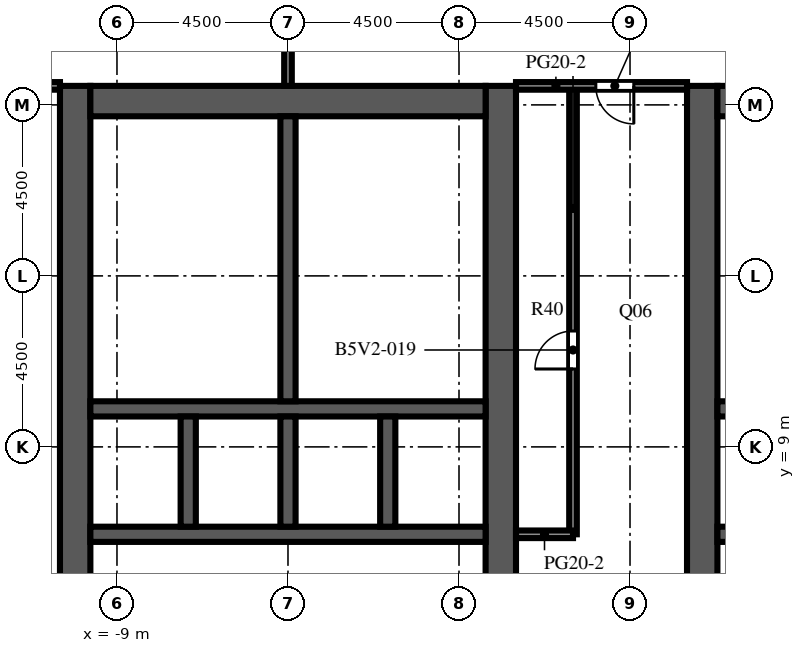
"""IFC4 building model, lengths in metres.
Left out: names, types, materials, properties, quantities, classifications, styles, units other than length and angle.
Written with IfcOpenShell. Run it as: python <this file> out.ifc"""

import sys

from ifc_helpers import new_model, si_unit, direction, frame, frame_2d, origin, place, context, subcontext, project, spatial, rectangle, extrude, element, fill, save


model = new_model("IFC4")
c1 = context("Model", 3, precision=1e-05, world=origin(), true_north=direction((0.0, 1.0)))
c2 = subcontext(c1, "Body", "Model", "MODEL_VIEW")
j1 = project(units=[si_unit("LENGTHUNIT", "METRE"), si_unit("PLANEANGLEUNIT", "RADIAN")], contexts=[c1])
p1 = place(None, origin())
s1 = spatial("IfcSite", under=j1, at=p1, CompositionType="ELEMENT")
p2 = place(p1, origin())
s2 = spatial("IfcBuilding", under=s1, at=p2, CompositionType="ELEMENT")
p3 = place(p2, frame((0.0, 0.0, 181.4)))
s3 = spatial("IfcBuildingStorey", under=s2, at=p3, CompositionType="ELEMENT", Elevation=181.4)
p4 = place(p3, frame((-10.1, -9.0, 0.0), z_axis=(0.0, 0.0, 1.0), x_axis=(0.0, 1.0, 0.0)))
e1 = element("IfcWall", 1, at=p4, inside=s3, PredefinedType="SHEAR", context=c2, shape_type="SweptSolid", body=[
    extrude(rectangle(XDim=27.5, YDim=0.8, at=frame_2d((13.75, 0.0))), origin(), (0.0, 0.0, 1.0), 4.1),
])
p5 = place(p4, frame((12.55, 0.0, 0.0)))
e2 = element("IfcOpeningElement", 2, at=p5, cuts=e1, PredefinedType="OPENING", context=c2, shape_type="SweptSolid", body=[
    extrude(rectangle(XDim=2.4, YDim=2.4, at=frame_2d((1.2, 1.2))), frame((0.0, 0.41, 0.0), z_axis=(0.0, -1.0, 0.0), x_axis=(1.0, 0.0, 0.0)), (0.0, 0.0, 1.0), 0.82),
])
p6 = place(p4, frame((6.825, 0.0, 0.0)))
e3 = element("IfcOpeningElement", 3, at=p6, cuts=e1, PredefinedType="OPENING", context=c2, shape_type="SweptSolid", body=[
    extrude(rectangle(XDim=1.2, YDim=2.1, at=frame_2d((0.6, 1.05))), frame((0.0, 0.41, 0.0), z_axis=(0.0, -1.0, 0.0), x_axis=(1.0, 0.0, 0.0)), (0.0, 0.0, 1.0), 0.82),
])
p7 = place(p4, frame((19.475, 0.0, 0.0)))
e4 = element("IfcOpeningElement", 4, at=p7, cuts=e1, PredefinedType="OPENING", context=c2, shape_type="SweptSolid", body=[
    extrude(rectangle(XDim=1.2, YDim=2.1, at=frame_2d((0.6, 1.05))), frame((0.0, 0.41, 0.0), z_axis=(0.0, -1.0, 0.0), x_axis=(1.0, 0.0, 0.0)), (0.0, 0.0, 1.0), 0.82),
])
p8 = place(p3, frame((1.1, -9.0, 0.0), z_axis=(0.0, 0.0, 1.0), x_axis=(0.0, 1.0, 0.0)))
e5 = element("IfcWall", 5, at=p8, inside=s3, PredefinedType="SHEAR", context=c2, shape_type="SweptSolid", body=[
    extrude(rectangle(XDim=27.5, YDim=0.8, at=frame_2d((13.75, 0.0))), origin(), (0.0, 0.0, 1.0), 4.1),
])
p9 = place(p8, frame((12.55, 0.0, 0.0)))
e6 = element("IfcOpeningElement", 6, at=p9, cuts=e5, PredefinedType="OPENING", context=c2, shape_type="SweptSolid", body=[
    extrude(rectangle(XDim=2.4, YDim=2.4, at=frame_2d((1.2, 1.2))), frame((0.0, 0.41, 0.0), z_axis=(0.0, -1.0, 0.0), x_axis=(1.0, 0.0, 0.0)), (0.0, 0.0, 1.0), 0.82),
])
p10 = place(p8, frame((3.85, 0.0, 0.0)))
e7 = element("IfcOpeningElement", 7, at=p10, cuts=e5, PredefinedType="OPENING", context=c2, shape_type="SweptSolid", body=[
    extrude(rectangle(XDim=0.95, YDim=2.1, at=frame_2d((0.475, 1.05))), frame((0.0, 0.41, 0.0), z_axis=(0.0, -1.0, 0.0), x_axis=(1.0, 0.0, 0.0)), (0.0, 0.0, 1.0), 0.82),
])
p11 = place(p8, frame((23.475, 0.0, 0.0)))
e8 = element("IfcOpeningElement", 8, at=p11, cuts=e5, PredefinedType="OPENING", context=c2, shape_type="SweptSolid", body=[
    extrude(rectangle(XDim=1.2, YDim=2.1, at=frame_2d((0.6, 1.05))), frame((0.0, 0.41, 0.0), z_axis=(0.0, -1.0, 0.0), x_axis=(1.0, 0.0, 0.0)), (0.0, 0.0, 1.0), 0.82),
])
p12 = place(p3, frame((-9.7, 18.1, 0.0), z_axis=(0.0, 0.0, 1.0), x_axis=(1.0, 0.0, 0.0)))
e9 = element("IfcWall", 9, at=p12, inside=s3, PredefinedType="SHEAR", context=c2, shape_type="SweptSolid", body=[
    extrude(rectangle(XDim=10.4, YDim=0.8, at=frame_2d((5.2, 0.0))), origin(), (0.0, 0.0, 1.0), 4.1),
])
p13 = place(p3, frame((-9.7, 6.7, 0.0), z_axis=(0.0, 0.0, 1.0), x_axis=(1.0, 0.0, 0.0)))
e10 = element("IfcWall", 10, at=p13, inside=s3, PredefinedType="SHEAR", context=c2, shape_type="SweptSolid", body=[
    extrude(rectangle(XDim=10.4, YDim=0.4, at=frame_2d((5.2, 0.0))), origin(), (0.0, 0.0, 1.0), 4.1),
])
p14 = place(p13, frame((3.337, 0.0, 0.0)))
e11 = element("IfcOpeningElement", 11, at=p14, cuts=e10, PredefinedType="OPENING", context=c2, shape_type="SweptSolid", body=[
    extrude(rectangle(XDim=1.1, YDim=2.1, at=frame_2d((0.55, 1.05))), frame((0.0, 0.21, 0.0), z_axis=(0.0, -1.0, 0.0), x_axis=(1.0, 0.0, 0.0)), (0.0, 0.0, 1.0), 0.42),
])
p15 = place(p13, frame((5.962, 0.0, 0.0)))
e12 = element("IfcOpeningElement", 12, at=p15, cuts=e10, PredefinedType="OPENING", context=c2, shape_type="SweptSolid", body=[
    extrude(rectangle(XDim=1.1, YDim=2.1, at=frame_2d((0.55, 1.05))), frame((0.0, 0.21, 0.0), z_axis=(0.0, -1.0, 0.0), x_axis=(1.0, 0.0, 0.0)), (0.0, 0.0, 1.0), 0.42),
])
p16 = place(p13, frame((8.663, 0.0, 0.0)))
e13 = element("IfcOpeningElement", 13, at=p16, cuts=e10, PredefinedType="OPENING", context=c2, shape_type="SweptSolid", body=[
    extrude(rectangle(XDim=1.1, YDim=2.1, at=frame_2d((0.55, 1.05))), frame((0.0, 0.21, 0.0), z_axis=(0.0, -1.0, 0.0), x_axis=(1.0, 0.0, 0.0)), (0.0, 0.0, 1.0), 0.42),
])
p17 = place(p13, frame((0.688, 0.0, 0.0)))
e14 = element("IfcOpeningElement", 14, at=p17, cuts=e10, PredefinedType="OPENING", context=c2, shape_type="SweptSolid", body=[
    extrude(rectangle(XDim=1.0, YDim=2.1, at=frame_2d((0.5, 1.05))), frame((0.0, 0.21, 0.0), z_axis=(0.0, -1.0, 0.0), x_axis=(1.0, 0.0, 0.0)), (0.0, 0.0, 1.0), 0.42),
])
p18 = place(p3, frame((-9.7, 10.0, 0.0), z_axis=(0.0, 0.0, 1.0), x_axis=(1.0, 0.0, 0.0)))
e15 = element("IfcWall", 15, at=p18, inside=s3, PredefinedType="SHEAR", context=c2, shape_type="SweptSolid", body=[
    extrude(rectangle(XDim=10.4, YDim=0.4, at=frame_2d((5.2, 0.0))), origin(), (0.0, 0.0, 1.0), 4.1),
])
for number, where, z_axis, x_axis in (
    (16, (-7.125, 6.9, 0.0), (0.0, 0.0, 1.0), (0.0, 1.0, 0.0)),
    (17, (-4.5, 6.9, 0.0), (0.0, 0.0, 1.0), (0.0, 1.0, 0.0)),
    (18, (-1.875, 6.9, 0.0), (0.0, 0.0, 1.0), (0.0, 1.0, 0.0)),
):
    element("IfcWall", number, at=place(p3, frame(where, z_axis=z_axis, x_axis=x_axis)), inside=s3, PredefinedType="SHEAR", context=c2, shape_type="SweptSolid", body=[
        extrude(rectangle(XDim=2.9, YDim=0.4, at=frame_2d((1.45, 0.0))), origin(), (0.0, 0.0, 1.0), 4.1),
    ])
p19 = place(p3, frame((-4.5, 10.2, 0.0), z_axis=(0.0, 0.0, 1.0), x_axis=(0.0, 1.0, 0.0)))
e19 = element("IfcWall", 19, at=p19, inside=s3, PredefinedType="SHEAR", context=c2, shape_type="SweptSolid", body=[
    extrude(rectangle(XDim=7.5, YDim=0.4, at=frame_2d((3.75, 0.0))), origin(), (0.0, 0.0, 1.0), 4.1),
])
p20 = place(p3, frame((6.4, -9.0, 0.0), z_axis=(0.0, 0.0, 1.0), x_axis=(0.0, 1.0, 0.0)))
e20 = element("IfcWall", 20, at=p20, inside=s3, PredefinedType="SHEAR", context=c2, shape_type="SweptSolid", body=[
    extrude(rectangle(XDim=27.5, YDim=0.8, at=frame_2d((13.75, 0.0))), origin(), (0.0, 0.0, 1.0), 4.1),
])
p21 = place(p20, frame((12.55, 0.0, 0.0)))
e21 = element("IfcOpeningElement", 21, at=p21, cuts=e20, PredefinedType="OPENING", context=c2, shape_type="SweptSolid", body=[
    extrude(rectangle(XDim=2.4, YDim=2.4, at=frame_2d((1.2, 1.2))), frame((0.0, 0.41, 0.0), z_axis=(0.0, -1.0, 0.0), x_axis=(1.0, 0.0, 0.0)), (0.0, 0.0, 1.0), 0.82),
])
p22 = place(p20, frame((3.85, 0.0, 0.0)))
e22 = element("IfcOpeningElement", 22, at=p22, cuts=e20, PredefinedType="OPENING", context=c2, shape_type="SweptSolid", body=[
    extrude(rectangle(XDim=0.95, YDim=2.1, at=frame_2d((0.475, 1.05))), frame((0.0, 0.41, 0.0), z_axis=(0.0, -1.0, 0.0), x_axis=(1.0, 0.0, 0.0)), (0.0, 0.0, 1.0), 0.82),
])
p23 = place(p20, frame((23.475, 0.0, 0.0)))
e23 = element("IfcOpeningElement", 23, at=p23, cuts=e20, PredefinedType="OPENING", context=c2, shape_type="SweptSolid", body=[
    extrude(rectangle(XDim=1.2, YDim=2.1, at=frame_2d((0.6, 1.05))), frame((0.0, 0.41, 0.0), z_axis=(0.0, -1.0, 0.0), x_axis=(1.0, 0.0, 0.0)), (0.0, 0.0, 1.0), 0.82),
])
p24 = place(p3, frame((6.8, 18.1, 0.0), z_axis=(0.0, 0.0, 1.0), x_axis=(1.0, 0.0, 0.0)))
e24 = element("IfcWall", 24, at=p24, inside=s3, PredefinedType="SHEAR", context=c2, shape_type="SweptSolid", body=[
    extrude(rectangle(XDim=10.4, YDim=0.8, at=frame_2d((5.2, 0.0))), origin(), (0.0, 0.0, 1.0), 4.1),
])
p25 = place(p3, frame((6.8, 6.7, 0.0), z_axis=(0.0, 0.0, 1.0), x_axis=(1.0, 0.0, 0.0)))
e25 = element("IfcWall", 25, at=p25, inside=s3, PredefinedType="SHEAR", context=c2, shape_type="SweptSolid", body=[
    extrude(rectangle(XDim=10.4, YDim=0.4, at=frame_2d((5.2, 0.0))), origin(), (0.0, 0.0, 1.0), 4.1),
])
p26 = place(p25, frame((3.337, 0.0, 0.0)))
e26 = element("IfcOpeningElement", 26, at=p26, cuts=e25, PredefinedType="OPENING", context=c2, shape_type="SweptSolid", body=[
    extrude(rectangle(XDim=1.1, YDim=2.1, at=frame_2d((0.55, 1.05))), frame((0.0, 0.21, 0.0), z_axis=(0.0, -1.0, 0.0), x_axis=(1.0, 0.0, 0.0)), (0.0, 0.0, 1.0), 0.42),
])
p27 = place(p25, frame((5.962, 0.0, 0.0)))
e27 = element("IfcOpeningElement", 27, at=p27, cuts=e25, PredefinedType="OPENING", context=c2, shape_type="SweptSolid", body=[
    extrude(rectangle(XDim=1.1, YDim=2.1, at=frame_2d((0.55, 1.05))), frame((0.0, 0.21, 0.0), z_axis=(0.0, -1.0, 0.0), x_axis=(1.0, 0.0, 0.0)), (0.0, 0.0, 1.0), 0.42),
])
p28 = place(p25, frame((8.663, 0.0, 0.0)))
e28 = element("IfcOpeningElement", 28, at=p28, cuts=e25, PredefinedType="OPENING", context=c2, shape_type="SweptSolid", body=[
    extrude(rectangle(XDim=1.1, YDim=2.1, at=frame_2d((0.55, 1.05))), frame((0.0, 0.21, 0.0), z_axis=(0.0, -1.0, 0.0), x_axis=(1.0, 0.0, 0.0)), (0.0, 0.0, 1.0), 0.42),
])
p29 = place(p25, frame((0.688, 0.0, 0.0)))
e29 = element("IfcOpeningElement", 29, at=p29, cuts=e25, PredefinedType="OPENING", context=c2, shape_type="SweptSolid", body=[
    extrude(rectangle(XDim=1.0, YDim=2.1, at=frame_2d((0.5, 1.05))), frame((0.0, 0.21, 0.0), z_axis=(0.0, -1.0, 0.0), x_axis=(1.0, 0.0, 0.0)), (0.0, 0.0, 1.0), 0.42),
])
p30 = place(p3, frame((6.8, 10.0, 0.0), z_axis=(0.0, 0.0, 1.0), x_axis=(1.0, 0.0, 0.0)))
e30 = element("IfcWall", 30, at=p30, inside=s3, PredefinedType="SHEAR", context=c2, shape_type="SweptSolid", body=[
    extrude(rectangle(XDim=10.4, YDim=0.4, at=frame_2d((5.2, 0.0))), origin(), (0.0, 0.0, 1.0), 4.1),
])
p31 = place(p3, frame((-0.6, 12.45, 0.0), z_axis=(0.0, 0.0, 1.0), x_axis=(1.0, 0.0, 0.0)))
e31 = element("IfcWall", 31, at=p31, inside=s3, PredefinedType="PARTITIONING", context=c2, shape_type="SweptSolid", body=[
    extrude(rectangle(XDim=1.3, YDim=0.1, at=frame_2d((0.65, 0.0))), origin(), (0.0, 0.0, 1.0), 3.5),
])
p32 = place(p31, frame((0.2, 0.0, 0.0)))
e32 = element("IfcOpeningElement", 32, at=p32, cuts=e31, PredefinedType="OPENING", context=c2, shape_type="SweptSolid", body=[
    extrude(rectangle(XDim=0.9, YDim=2.1, at=frame_2d((0.45, 1.05))), frame((0.0, 0.06, 0.0), z_axis=(0.0, -1.0, 0.0), x_axis=(1.0, 0.0, 0.0)), (0.0, 0.0, 1.0), 0.12),
])
p33 = place(p3, frame((-4.3, 12.45, 0.0), z_axis=(0.0, 0.0, 1.0), x_axis=(1.0, 0.0, 0.0)))
e33 = element("IfcWall", 33, at=p33, inside=s3, PredefinedType="PARTITIONING", context=c2, shape_type="SweptSolid", body=[
    extrude(rectangle(XDim=3.7, YDim=0.1, at=frame_2d((1.85, 0.0))), origin(), (0.0, 0.0, 1.0), 3.5),
])
p34 = place(p3, frame((-0.6, 12.45, 0.0), z_axis=(0.0, 0.0, 1.0), x_axis=(0.0, 1.0, 0.0)))
e34 = element("IfcWall", 34, at=p34, inside=s3, PredefinedType="PARTITIONING", context=c2, shape_type="SweptSolid", body=[
    extrude(rectangle(XDim=2.625, YDim=0.1, at=frame_2d((1.312, 0.0))), origin(), (0.0, 0.0, 1.0), 3.5),
])
p35 = place(p34, frame((0.812, 0.0, 0.0)))
e35 = element("IfcOpeningElement", 35, at=p35, cuts=e34, PredefinedType="OPENING", context=c2, shape_type="SweptSolid", body=[
    extrude(rectangle(XDim=1.0, YDim=2.1, at=frame_2d((0.5, 1.05))), frame((0.0, 0.06, 0.0), z_axis=(0.0, -1.0, 0.0), x_axis=(1.0, 0.0, 0.0)), (0.0, 0.0, 1.0), 0.12),
])
p36 = place(p3, frame((-0.6, 15.075, 0.0), z_axis=(0.0, 0.0, 1.0), x_axis=(0.0, 1.0, 0.0)))
e36 = element("IfcWall", 36, at=p36, inside=s3, PredefinedType="PARTITIONING", context=c2, shape_type="SweptSolid", body=[
    extrude(rectangle(XDim=2.625, YDim=0.1, at=frame_2d((1.312, 0.0))), origin(), (0.0, 0.0, 1.0), 3.5),
])
p37 = place(p36, frame((0.812, 0.0, 0.0)))
e37 = element("IfcOpeningElement", 37, at=p37, cuts=e36, PredefinedType="OPENING", context=c2, shape_type="SweptSolid", body=[
    extrude(rectangle(XDim=1.0, YDim=2.1, at=frame_2d((0.5, 1.05))), frame((0.0, 0.06, 0.0), z_axis=(0.0, -1.0, 0.0), x_axis=(1.0, 0.0, 0.0)), (0.0, 0.0, 1.0), 0.12),
])
p38 = place(p3, frame((-4.3, 15.075, 0.0), z_axis=(0.0, 0.0, 1.0), x_axis=(1.0, 0.0, 0.0)))
e38 = element("IfcWall", 38, at=p38, inside=s3, PredefinedType="PARTITIONING", context=c2, shape_type="SweptSolid", body=[
    extrude(rectangle(XDim=3.7, YDim=0.1, at=frame_2d((1.85, 0.0))), origin(), (0.0, 0.0, 1.0), 3.5),
])
p39 = place(p3, frame((6.8, 12.45, 0.0), z_axis=(0.0, 0.0, 1.0), x_axis=(1.0, 0.0, 0.0)))
e39 = element("IfcWall", 39, at=p39, inside=s3, PredefinedType="PARTITIONING", context=c2, shape_type="SweptSolid", body=[
    extrude(rectangle(XDim=1.3, YDim=0.1, at=frame_2d((0.65, 0.0))), origin(), (0.0, 0.0, 1.0), 3.5),
])
p40 = place(p39, frame((0.2, 0.0, 0.0)))
e40 = element("IfcOpeningElement", 40, at=p40, cuts=e39, PredefinedType="OPENING", context=c2, shape_type="SweptSolid", body=[
    extrude(rectangle(XDim=0.9, YDim=2.1, at=frame_2d((0.45, 1.05))), frame((0.0, 0.06, 0.0), z_axis=(0.0, -1.0, 0.0), x_axis=(1.0, 0.0, 0.0)), (0.0, 0.0, 1.0), 0.12),
])
p41 = place(p3, frame((-4.5, 18.5, 0.0), z_axis=(0.0, 0.0, 1.0), x_axis=(0.0, 1.0, 0.0)))
e41 = element("IfcWall", 41, at=p41, inside=s3, PredefinedType="PARTITIONING", context=c2, shape_type="SweptSolid", body=[
    extrude(rectangle(XDim=8.0, YDim=0.2, at=frame_2d((4.0, 0.0))), origin(), (0.0, 0.0, 1.0), 3.5),
])
p42 = place(p3, frame((3.0, 6.7, 0.0), z_axis=(0.0, 0.0, 1.0), x_axis=(0.0, 1.0, 0.0)))
e42 = element("IfcWall", 42, at=p42, inside=s3, PredefinedType="PARTITIONING", context=c2, shape_type="SweptSolid", body=[
    extrude(rectangle(XDim=11.8, YDim=0.2, at=frame_2d((5.9, 0.0))), origin(), (0.0, 0.0, 1.0), 3.5),
])
p43 = place(p42, frame((4.35, 0.0, 0.0)))
e43 = element("IfcOpeningElement", 43, at=p43, cuts=e42, PredefinedType="OPENING", context=c2, shape_type="SweptSolid", body=[
    extrude(rectangle(XDim=1.0, YDim=2.1, at=frame_2d((0.5, 1.05))), frame((0.0, 0.11, 0.0), z_axis=(0.0, -1.0, 0.0), x_axis=(1.0, 0.0, 0.0)), (0.0, 0.0, 1.0), 0.22),
])
p44 = place(p3, frame((1.5, 6.7, 0.0), z_axis=(0.0, 0.0, 1.0), x_axis=(1.0, 0.0, 0.0)))
e44 = element("IfcWall", 44, at=p44, inside=s3, PredefinedType="PARTITIONING", context=c2, shape_type="SweptSolid", body=[
    extrude(rectangle(XDim=1.5, YDim=0.2, at=frame_2d((0.75, 0.0))), origin(), (0.0, 0.0, 1.0), 3.5),
])
p45 = place(p3, frame((-13.5, 18.5, 0.0), z_axis=(0.0, 0.0, 1.0), x_axis=(1.0, 0.0, 0.0)))
e45 = element("IfcWall", 45, at=p45, inside=s3, PredefinedType="PARTITIONING", context=c2, shape_type="SweptSolid", body=[
    extrude(rectangle(XDim=3.0, YDim=0.2, at=frame_2d((1.5, 0.0))), origin(), (0.0, 0.0, 1.0), 3.5),
])
p46 = place(p45, frame((1.1, 0.0, 0.0)))
e46 = element("IfcOpeningElement", 46, at=p46, cuts=e45, PredefinedType="OPENING", context=c2, shape_type="SweptSolid", body=[
    extrude(rectangle(XDim=1.0, YDim=2.1, at=frame_2d((0.5, 1.05))), frame((0.0, 0.11, 0.0), z_axis=(0.0, -1.0, 0.0), x_axis=(1.0, 0.0, 0.0)), (0.0, 0.0, 1.0), 0.22),
])
p47 = place(p3, frame((1.5, 18.5, 0.0), z_axis=(0.0, 0.0, 1.0), x_axis=(1.0, 0.0, 0.0)))
e47 = element("IfcWall", 47, at=p47, inside=s3, PredefinedType="PARTITIONING", context=c2, shape_type="SweptSolid", body=[
    extrude(rectangle(XDim=4.5, YDim=0.2, at=frame_2d((2.25, 0.0))), origin(), (0.0, 0.0, 1.0), 3.5),
])
p48 = place(p47, frame((2.1, 0.0, 0.0)))
e48 = element("IfcOpeningElement", 48, at=p48, cuts=e47, PredefinedType="OPENING", context=c2, shape_type="SweptSolid", body=[
    extrude(rectangle(XDim=1.0, YDim=2.1, at=frame_2d((0.5, 1.05))), frame((0.0, 0.11, 0.0), z_axis=(0.0, -1.0, 0.0), x_axis=(1.0, 0.0, 0.0)), (0.0, 0.0, 1.0), 0.22),
])
p49 = place(p14, origin())
e49 = element("IfcDoor", 49, at=p49, inside=s3, OperationType="DOUBLE_DOOR_SLIDING", PredefinedType="DOOR", context=c2, shape_type="SweptSolid", body=[
    extrude(rectangle(XDim=1.1, YDim=2.1, at=frame_2d((0.55, 1.05))), frame((0.0, 0.025, 0.0), z_axis=(0.0, -1.0, 0.0), x_axis=(1.0, 0.0, 0.0)), (0.0, 0.0, 1.0), 0.05),
])
fill(e11, e49)
p50 = place(p15, origin())
e50 = element("IfcDoor", 50, at=p50, inside=s3, OperationType="DOUBLE_DOOR_SLIDING", PredefinedType="DOOR", context=c2, shape_type="SweptSolid", body=[
    extrude(rectangle(XDim=1.1, YDim=2.1, at=frame_2d((0.55, 1.05))), frame((0.0, 0.025, 0.0), z_axis=(0.0, -1.0, 0.0), x_axis=(1.0, 0.0, 0.0)), (0.0, 0.0, 1.0), 0.05),
])
fill(e12, e50)
p51 = place(p16, origin())
e51 = element("IfcDoor", 51, at=p51, inside=s3, OperationType="DOUBLE_DOOR_SLIDING", PredefinedType="DOOR", context=c2, shape_type="SweptSolid", body=[
    extrude(rectangle(XDim=1.1, YDim=2.1, at=frame_2d((0.55, 1.05))), frame((0.0, 0.025, 0.0), z_axis=(0.0, -1.0, 0.0), x_axis=(1.0, 0.0, 0.0)), (0.0, 0.0, 1.0), 0.05),
])
fill(e13, e51)
p52 = place(p5, origin())
e52 = element("IfcDoor", 52, at=p52, inside=s3, OperationType="DOUBLE_DOOR_DOUBLE_SWING", PredefinedType="DOOR", context=c2, shape_type="SweptSolid", body=[
    extrude(rectangle(XDim=2.4, YDim=2.4, at=frame_2d((1.2, 1.2))), frame((0.0, 0.025, 0.0), z_axis=(0.0, -1.0, 0.0), x_axis=(1.0, 0.0, 0.0)), (0.0, 0.0, 1.0), 0.05),
])
fill(e2, e52)
p53 = place(p9, origin())
e53 = element("IfcDoor", 53, at=p53, inside=s3, OperationType="DOUBLE_DOOR_DOUBLE_SWING", PredefinedType="DOOR", context=c2, shape_type="SweptSolid", body=[
    extrude(rectangle(XDim=2.4, YDim=2.4, at=frame_2d((1.2, 1.2))), frame((0.0, 0.025, 0.0), z_axis=(0.0, -1.0, 0.0), x_axis=(1.0, 0.0, 0.0)), (0.0, 0.0, 1.0), 0.05),
])
fill(e6, e53)
p54 = place(p21, origin())
e54 = element("IfcDoor", 54, at=p54, inside=s3, OperationType="DOUBLE_DOOR_DOUBLE_SWING", PredefinedType="DOOR", context=c2, shape_type="SweptSolid", body=[
    extrude(rectangle(XDim=2.4, YDim=2.4, at=frame_2d((1.2, 1.2))), frame((0.0, 0.025, 0.0), z_axis=(0.0, -1.0, 0.0), x_axis=(1.0, 0.0, 0.0)), (0.0, 0.0, 1.0), 0.05),
])
fill(e21, e54)
p55 = place(p7, origin())
e55 = element("IfcDoor", 55, at=p55, inside=s3, OperationType="SINGLE_SWING_LEFT", PredefinedType="DOOR", context=c2, shape_type="SweptSolid", body=[
    extrude(rectangle(XDim=1.2, YDim=2.1, at=frame_2d((0.6, 1.05))), frame((0.0, 0.025, 0.0), z_axis=(0.0, -1.0, 0.0), x_axis=(1.0, 0.0, 0.0)), (0.0, 0.0, 1.0), 0.05),
])
fill(e4, e55)
p56 = place(p17, origin())
e56 = element("IfcDoor", 56, at=p56, inside=s3, OperationType="SINGLE_SWING_LEFT", PredefinedType="DOOR", context=c2, shape_type="SweptSolid", body=[
    extrude(rectangle(XDim=1.0, YDim=2.1, at=frame_2d((0.5, 1.05))), frame((0.0, 0.025, 0.0), z_axis=(0.0, -1.0, 0.0), x_axis=(1.0, 0.0, 0.0)), (0.0, 0.0, 1.0), 0.05),
])
fill(e14, e56)
p57 = place(p32, origin())
e57 = element("IfcDoor", 57, at=p57, inside=s3, OperationType="SINGLE_SWING_LEFT", PredefinedType="DOOR", context=c2, shape_type="SweptSolid", body=[
    extrude(rectangle(XDim=0.9, YDim=2.1, at=frame_2d((0.45, 1.05))), frame((0.0, 0.025, 0.0), z_axis=(0.0, -1.0, 0.0), x_axis=(1.0, 0.0, 0.0)), (0.0, 0.0, 1.0), 0.05),
])
fill(e32, e57)
p58 = place(p11, origin())
e58 = element("IfcDoor", 58, at=p58, inside=s3, OperationType="SINGLE_SWING_RIGHT", PredefinedType="DOOR", context=c2, shape_type="SweptSolid", body=[
    extrude(rectangle(XDim=1.2, YDim=2.1, at=frame_2d((0.6, 1.05))), frame((0.0, 0.375, 0.0), z_axis=(0.0, -1.0, 0.0), x_axis=(1.0, 0.0, 0.0)), (0.0, 0.0, 1.0), 0.05),
])
fill(e8, e58)
p59 = place(p35, origin())
e59 = element("IfcDoor", 59, at=p59, inside=s3, OperationType="SINGLE_SWING_LEFT", PredefinedType="DOOR", context=c2, shape_type="SweptSolid", body=[
    extrude(rectangle(XDim=1.0, YDim=2.1, at=frame_2d((0.5, 1.05))), frame((0.0, 0.025, 0.0), z_axis=(0.0, -1.0, 0.0), x_axis=(1.0, 0.0, 0.0)), (0.0, 0.0, 1.0), 0.05),
])
fill(e35, e59)
p60 = place(p37, origin())
e60 = element("IfcDoor", 60, at=p60, inside=s3, OperationType="SINGLE_SWING_RIGHT", PredefinedType="DOOR", context=c2, shape_type="SweptSolid", body=[
    extrude(rectangle(XDim=1.0, YDim=2.1, at=frame_2d((0.5, 1.05))), frame((0.0, 0.025, 0.0), z_axis=(0.0, -1.0, 0.0), x_axis=(1.0, 0.0, 0.0)), (0.0, 0.0, 1.0), 0.05),
])
fill(e37, e60)
p61 = place(p23, origin())
e61 = element("IfcDoor", 61, at=p61, inside=s3, OperationType="SINGLE_SWING_LEFT", PredefinedType="DOOR", context=c2, shape_type="SweptSolid", body=[
    extrude(rectangle(XDim=1.2, YDim=2.1, at=frame_2d((0.6, 1.05))), frame((0.0, -0.325, 0.0), z_axis=(0.0, -1.0, 0.0), x_axis=(1.0, 0.0, 0.0)), (0.0, 0.0, 1.0), 0.05),
])
fill(e23, e61)
p62 = place(p43, origin())
e62 = element("IfcDoor", 62, at=p62, inside=s3, OperationType="SINGLE_SWING_LEFT", PredefinedType="DOOR", context=c2, shape_type="SweptSolid", body=[
    extrude(rectangle(XDim=1.0, YDim=2.1, at=frame_2d((0.5, 1.05))), frame((0.0, 0.025, 0.0), z_axis=(0.0, -1.0, 0.0), x_axis=(1.0, 0.0, 0.0)), (0.0, 0.0, 1.0), 0.05),
])
fill(e43, e62)
p63 = place(p48, origin())
e63 = element("IfcDoor", 63, at=p63, inside=s3, OperationType="SINGLE_SWING_RIGHT", PredefinedType="DOOR", context=c2, shape_type="SweptSolid", body=[
    extrude(rectangle(XDim=1.0, YDim=2.1, at=frame_2d((0.5, 1.05))), frame((0.0, 0.025, 0.0), z_axis=(0.0, -1.0, 0.0), x_axis=(1.0, 0.0, 0.0)), (0.0, 0.0, 1.0), 0.05),
])
fill(e48, e63)
save(model, sys.argv[1])
